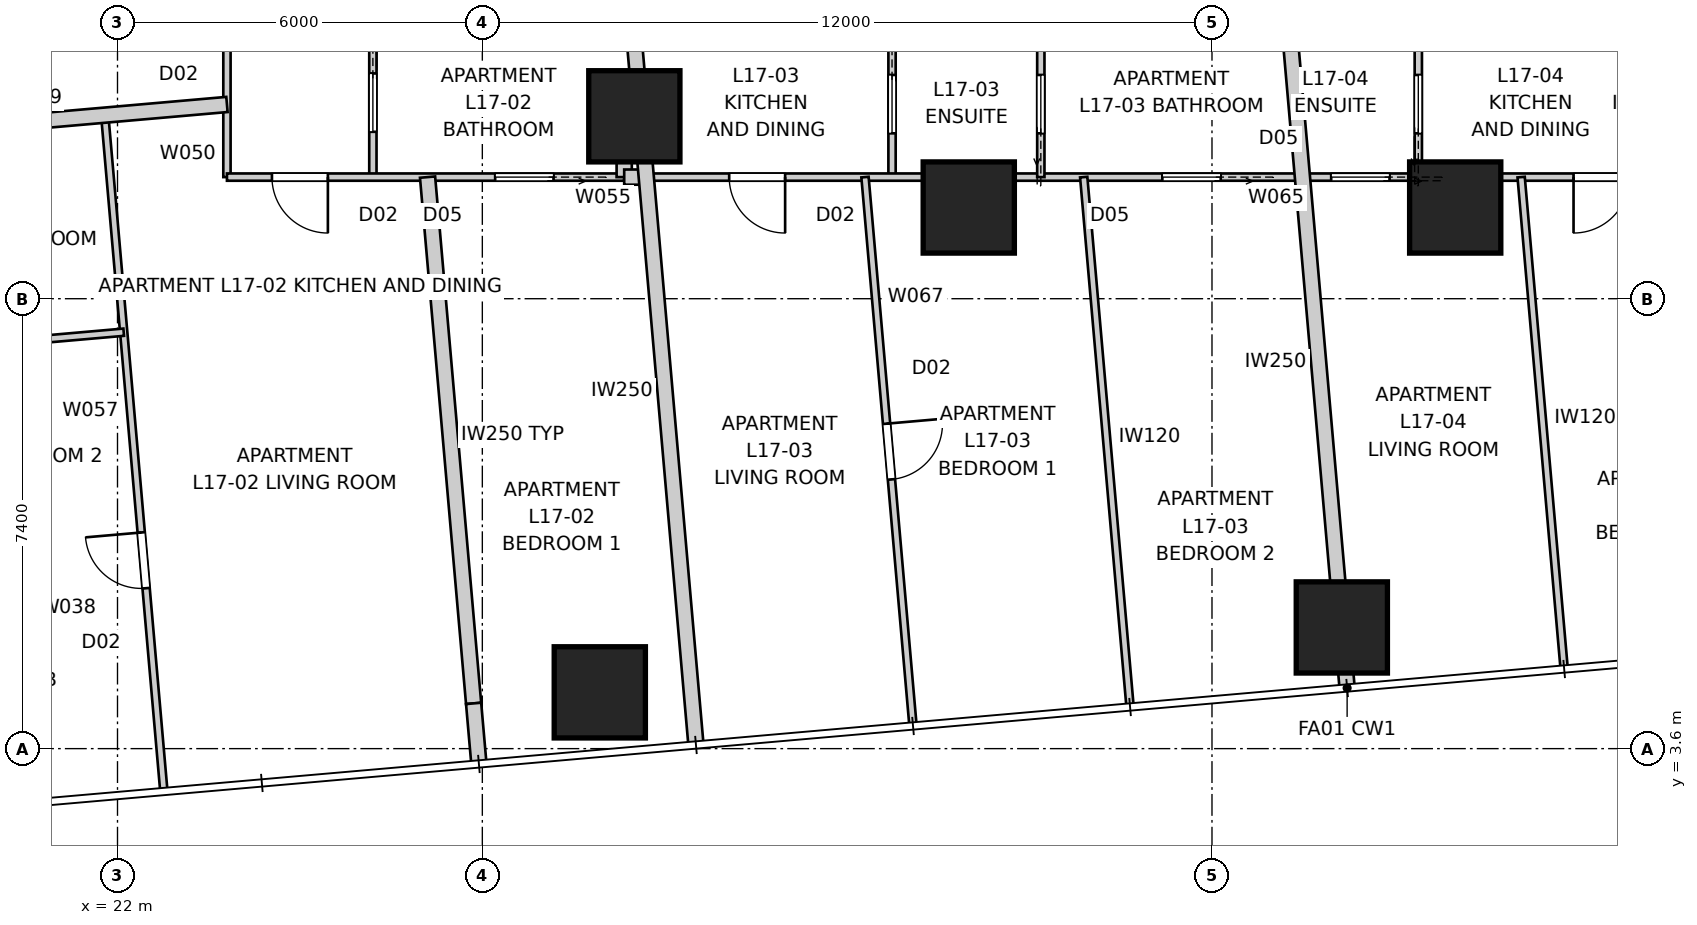
"""IFC4 building model, lengths in metres.
Left out: names, types, materials, properties, quantities, classifications, styles, units other than length and angle.
Written with IfcOpenShell. Run it as: python <this file> out.ifc"""

import sys

from ifc_helpers import new_model, si_unit, direction, frame, frame_2d, origin, origin_2d, place, context, subcontext, project, spatial, rectangle, extrude, element, fill, save


model = new_model("IFC4")
c1 = context("Model", 3, precision=1e-05, world=origin(), true_north=direction((0.0, 1.0)))
c2 = subcontext(c1, "Body", "Model", "MODEL_VIEW")
j1 = project(units=[si_unit("LENGTHUNIT", "METRE"), si_unit("PLANEANGLEUNIT", "RADIAN")], contexts=[c1])
p1 = place(None, origin())
s1 = spatial("IfcSite", under=j1, at=p1, CompositionType="ELEMENT")
p2 = place(p1, origin())
s2 = spatial("IfcBuilding", under=s1, at=p2, CompositionType="ELEMENT")
p3 = place(p2, frame((0.0, 0.0, 64.2)))
s3 = spatial("IfcBuildingStorey", under=s2, at=p3, CompositionType="ELEMENT", Elevation=64.2)
for number, where, z_axis, x_axis in (
    (1, (29.932, 4.526, 0.0), (0.0, 0.0, 1.0), (1.0, 0.0, 0.0)),
    (2, (42.135, 5.593, 0.0), (0.0, 0.0, 1.0), (1.0, 0.0, 0.0)),
    (3, (30.5, 14.0, 0.0), (0.0, 0.0, 1.0), (1.0, 0.0, 0.0)),
    (4, (36.0, 12.5, 0.0), (0.0, 0.0, 1.0), (1.0, 0.0, 0.0)),
    (5, (44.0, 12.5, 0.0), (0.0, 0.0, 1.0), (1.0, 0.0, 0.0)),
):
    element("IfcColumn", number, at=place(p3, frame(where, z_axis=z_axis, x_axis=x_axis)), inside=s3, PredefinedType="COLUMN", context=c2, shape_type="SweptSolid", body=[
        extrude(rectangle(XDim=1.5, YDim=1.5, at=origin_2d()), origin(), (0.0, 0.0, 1.0), 3.4),
    ])
p4 = place(p3, frame((42.222, 4.597, 0.0), z_axis=(0.0, 0.0, 1.0), x_axis=(-0.087140211333, 0.996196056792, 0.0)))
e6 = element("IfcWall", 6, at=p4, inside=s3, PredefinedType="PARTITIONING", context=c2, shape_type="SweptSolid", body=[
    extrude(rectangle(XDim=10.873, YDim=0.25, at=frame_2d((5.437, 0.0))), origin(), (0.0, 0.0, 1.0), 3.25),
])
p5 = place(p3, frame((31.513, 3.66, 0.0), z_axis=(0.0, 0.0, 1.0), x_axis=(-0.087168232078, 0.996193605338, 0.0)))
e7 = element("IfcWall", 7, at=p5, inside=s3, PredefinedType="PARTITIONING", context=c2, shape_type="SweptSolid", body=[
    extrude(rectangle(XDim=11.814, YDim=0.25, at=frame_2d((5.907, 0.0))), origin(), (0.0, 0.0, 1.0), 3.25),
])
p6 = place(p3, frame((23.8, 13.0, 0.0), z_axis=(0.0, 0.0, 1.0), x_axis=(0.0, 1.0, 0.0)))
e8 = element("IfcWall", 8, at=p6, inside=s3, PredefinedType="PARTITIONING", context=c2, shape_type="SweptSolid", body=[
    extrude(rectangle(XDim=8.439, YDim=0.12, at=frame_2d((4.219, 0.0))), origin(), (0.0, 0.0, 1.0), 2.55),
])
p7 = place(p6, frame((2.508, 0.0, 0.0)))
e9 = element("IfcOpeningElement", 9, at=p7, cuts=e8, PredefinedType="OPENING", context=c2, shape_type="SweptSolid", body=[
    extrude(rectangle(XDim=0.92, YDim=2.34, at=frame_2d((0.46, 1.17))), frame((0.0, 0.07, 0.0), z_axis=(0.0, -1.0, 0.0), x_axis=(1.0, 0.0, 0.0)), (0.0, 0.0, 1.0), 0.14),
])
p8 = place(p6, frame((5.685, 0.0, 0.0)))
e10 = element("IfcOpeningElement", 10, at=p8, cuts=e8, PredefinedType="OPENING", context=c2, shape_type="SweptSolid", body=[
    extrude(rectangle(XDim=0.96, YDim=2.1, at=frame_2d((0.48, 1.05))), frame((0.0, 0.07, 0.0), z_axis=(0.0, -1.0, 0.0), x_axis=(1.0, 0.0, 0.0)), (0.0, 0.0, 1.0), 0.14),
])
p9 = place(p3, frame((26.2, 15.45, 0.0), z_axis=(0.0, 0.0, 1.0), x_axis=(0.0, -1.0, 0.0)))
e11 = element("IfcWall", 11, at=p9, inside=s3, PredefinedType="PARTITIONING", context=c2, shape_type="SweptSolid", body=[
    extrude(rectangle(XDim=2.45, YDim=0.12, at=frame_2d((1.225, 0.0))), origin(), (0.0, 0.0, 1.0), 3.25),
])
p10 = place(p9, frame((0.745, 0.0, 0.0)))
e12 = element("IfcOpeningElement", 12, at=p10, cuts=e11, PredefinedType="OPENING", context=c2, shape_type="SweptSolid", body=[
    extrude(rectangle(XDim=0.96, YDim=2.1, at=frame_2d((0.48, 1.05))), frame((0.0, 0.07, 0.0), z_axis=(0.0, -1.0, 0.0), x_axis=(1.0, 0.0, 0.0)), (0.0, 0.0, 1.0), 0.14),
])
p11 = place(p3, frame((30.333, 13.0, 0.0), z_axis=(0.0, 0.0, 1.0), x_axis=(-1.0, 0.0, 0.0)))
e13 = element("IfcWall", 13, at=p11, inside=s3, PredefinedType="PARTITIONING", context=c2, shape_type="SweptSolid", body=[
    extrude(rectangle(XDim=6.533, YDim=0.12, at=frame_2d((3.267, 0.0))), origin(), (0.0, 0.0, 1.0), 3.25),
])
p12 = place(p11, frame((4.873, 0.0, 0.0)))
e14 = element("IfcOpeningElement", 14, at=p12, cuts=e13, PredefinedType="OPENING", context=c2, shape_type="SweptSolid", body=[
    extrude(rectangle(XDim=0.92, YDim=2.34, at=frame_2d((0.46, 1.17))), frame((0.0, 0.07, 0.0), z_axis=(0.0, -1.0, 0.0), x_axis=(1.0, 0.0, 0.0)), (0.0, 0.0, 1.0), 0.14),
])
p13 = place(p11, frame((1.162, 0.0, 0.0)))
e15 = element("IfcOpeningElement", 15, at=p13, cuts=e13, PredefinedType="OPENING", context=c2, shape_type="SweptSolid", body=[
    extrude(rectangle(XDim=0.96, YDim=2.1, at=frame_2d((0.48, 1.05))), frame((0.0, 0.07, 0.0), z_axis=(0.0, -1.0, 0.0), x_axis=(1.0, 0.0, 0.0)), (0.0, 0.0, 1.0), 0.14),
])
p14 = place(p3, frame((30.333, 14.396, 0.0), z_axis=(0.0, 0.0, 1.0), x_axis=(0.0, -1.0, 0.0)))
e16 = element("IfcWall", 16, at=p14, inside=s3, PredefinedType="PARTITIONING", context=c2, shape_type="SweptSolid", body=[
    extrude(rectangle(XDim=1.396, YDim=0.25, at=frame_2d((0.698, 0.0))), origin(), (0.0, 0.0, 1.0), 3.25),
])
p15 = place(p3, frame((22.759, 2.934, 0.0), z_axis=(0.0, 0.0, 1.0), x_axis=(-0.087130477128, 0.996196908224, 0.0)))
e17 = element("IfcWall", 17, at=p15, inside=s3, PredefinedType="PARTITIONING", context=c2, shape_type="SweptSolid", body=[
    extrude(rectangle(XDim=11.127, YDim=0.12, at=frame_2d((5.563, 0.0))), origin(), (0.0, 0.0, 1.0), 3.25),
])
p16 = place(p15, frame((3.317, 0.0, 0.0)))
e18 = element("IfcOpeningElement", 18, at=p16, cuts=e17, PredefinedType="OPENING", context=c2, shape_type="SweptSolid", body=[
    extrude(rectangle(XDim=0.92, YDim=2.34, at=frame_2d((0.46, 1.17))), frame((0.0, 0.07, 0.0), z_axis=(0.0, -1.0, 0.0), x_axis=(1.0, 0.0, 0.0)), (0.0, 0.0, 1.0), 0.14),
])
p17 = place(p3, frame((16.843, 13.586, 0.0), z_axis=(0.0, 0.0, 1.0), x_axis=(0.996195462691, 0.087147002895, 0.0)))
e19 = element("IfcWall", 19, at=p17, inside=s3, PredefinedType="PARTITIONING", context=c2, shape_type="SweptSolid", body=[
    extrude(rectangle(XDim=6.984, YDim=0.25, at=frame_2d((3.492, 0.0))), origin(), (0.0, 0.0, 1.0), 2.638),
])
p18 = place(p17, frame((1.548, 0.0, 0.0)))
e20 = element("IfcOpeningElement", 20, at=p18, cuts=e19, PredefinedType="OPENING", context=c2, shape_type="SweptSolid", body=[
    extrude(rectangle(XDim=0.92, YDim=2.34, at=frame_2d((0.46, 1.17))), frame((0.0, 0.135, 0.0), z_axis=(0.0, -1.0, 0.0), x_axis=(1.0, 0.0, 0.0)), (0.0, 0.0, 1.0), 0.27),
])
p19 = place(p3, frame((27.099, 13.0, 0.0), z_axis=(0.0, 0.0, 1.0), x_axis=(0.087158236544, -0.99619447991, 0.0)))
e21 = element("IfcWall", 21, at=p19, inside=s3, PredefinedType="PARTITIONING", context=c2, shape_type="SweptSolid", body=[
    extrude(rectangle(XDim=8.689, YDim=0.25, at=frame_2d((4.344, 0.0))), origin(), (0.0, 0.0, 1.0), 2.638),
])
p20 = place(p3, frame((27.856, 4.344, 0.0), z_axis=(0.0, 0.0, 1.0), x_axis=(0.087233202944, -0.996187918168, 0.0)))
e22 = element("IfcWall", 22, at=p20, inside=s3, PredefinedType="PARTITIONING", context=c2, shape_type="SweptSolid", body=[
    extrude(rectangle(XDim=0.96, YDim=0.25, at=frame_2d((0.48, 0.0))), origin(), (0.0, 0.0, 1.0), 3.25),
])
p21 = place(p3, frame((30.333, 13.0, 0.0), z_axis=(0.0, 0.0, 1.0), x_axis=(1.0, 0.0, 0.0)))
e23 = element("IfcWall", 23, at=p21, inside=s3, PredefinedType="PARTITIONING", context=c2, shape_type="SweptSolid", body=[
    extrude(rectangle(XDim=0.363, YDim=0.25, at=frame_2d((0.182, 0.0))), origin(), (0.0, 0.0, 1.0), 3.25),
])
p22 = place(p3, frame((16.198, 9.933, 0.0), z_axis=(0.0, 0.0, 1.0), x_axis=(0.996196712973, 0.08713270948, 0.0)))
e24 = element("IfcWall", 24, at=p22, inside=s3, PredefinedType="PARTITIONING", context=c2, shape_type="SweptSolid", body=[
    extrude(rectangle(XDim=5.926, YDim=0.12, at=frame_2d((2.963, 0.0))), origin(), (0.0, 0.0, 1.0), 3.25),
])
p23 = place(p3, frame((34.738, 15.4, 0.0), z_axis=(0.0, 0.0, 1.0), x_axis=(0.0, -1.0, 0.0)))
e25 = element("IfcWall", 25, at=p23, inside=s3, PredefinedType="PARTITIONING", context=c2, shape_type="SweptSolid", body=[
    extrude(rectangle(XDim=2.4, YDim=0.12, at=frame_2d((1.2, 0.0))), origin(), (0.0, 0.0, 1.0), 3.25),
])
p24 = place(p23, frame((0.72, 0.0, 0.0)))
e26 = element("IfcOpeningElement", 26, at=p24, cuts=e25, PredefinedType="OPENING", context=c2, shape_type="SweptSolid", body=[
    extrude(rectangle(XDim=0.96, YDim=2.1, at=frame_2d((0.48, 1.05))), frame((0.0, 0.07, 0.0), z_axis=(0.0, -1.0, 0.0), x_axis=(1.0, 0.0, 0.0)), (0.0, 0.0, 1.0), 0.14),
])
p25 = place(p3, frame((47.778, 13.0, 0.0), z_axis=(0.0, 0.0, 1.0), x_axis=(-1.0, 0.0, 0.0)))
e27 = element("IfcWall", 27, at=p25, inside=s3, PredefinedType="PARTITIONING", context=c2, shape_type="SweptSolid", body=[
    extrude(rectangle(XDim=17.082, YDim=0.12, at=frame_2d((8.541, 0.0))), origin(), (0.0, 0.0, 1.0), 2.55),
])
p26 = place(p25, frame((0.912, 0.0, 0.0)))
e28 = element("IfcOpeningElement", 28, at=p26, cuts=e27, PredefinedType="OPENING", context=c2, shape_type="SweptSolid", body=[
    extrude(rectangle(XDim=0.92, YDim=2.34, at=frame_2d((0.46, 1.17))), frame((0.0, 0.07, 0.0), z_axis=(0.0, -1.0, 0.0), x_axis=(1.0, 0.0, 0.0)), (0.0, 0.0, 1.0), 0.14),
])
p27 = place(p25, frame((14.798, 0.0, 0.0)))
e29 = element("IfcOpeningElement", 29, at=p27, cuts=e27, PredefinedType="OPENING", context=c2, shape_type="SweptSolid", body=[
    extrude(rectangle(XDim=0.92, YDim=2.34, at=frame_2d((0.46, 1.17))), frame((0.0, 0.07, 0.0), z_axis=(0.0, -1.0, 0.0), x_axis=(1.0, 0.0, 0.0)), (0.0, 0.0, 1.0), 0.14),
])
p28 = place(p25, frame((4.858, 0.0, 0.0)))
e30 = element("IfcOpeningElement", 30, at=p28, cuts=e27, PredefinedType="OPENING", context=c2, shape_type="SweptSolid", body=[
    extrude(rectangle(XDim=0.96, YDim=2.1, at=frame_2d((0.48, 1.05))), frame((0.0, 0.07, 0.0), z_axis=(0.0, -1.0, 0.0), x_axis=(1.0, 0.0, 0.0)), (0.0, 0.0, 1.0), 0.14),
])
p29 = place(p25, frame((7.635, 0.0, 0.0)))
e31 = element("IfcOpeningElement", 31, at=p29, cuts=e27, PredefinedType="OPENING", context=c2, shape_type="SweptSolid", body=[
    extrude(rectangle(XDim=0.96, YDim=2.1, at=frame_2d((0.48, 1.05))), frame((0.0, 0.07, 0.0), z_axis=(0.0, -1.0, 0.0), x_axis=(1.0, 0.0, 0.0)), (0.0, 0.0, 1.0), 0.14),
])
p30 = place(p3, frame((37.185, 13.0, 0.0), z_axis=(0.0, 0.0, 1.0), x_axis=(0.0, 1.0, 0.0)))
e32 = element("IfcWall", 32, at=p30, inside=s3, PredefinedType="PARTITIONING", context=c2, shape_type="SweptSolid", body=[
    extrude(rectangle(XDim=2.4, YDim=0.12, at=frame_2d((1.2, 0.0))), origin(), (0.0, 0.0, 1.0), 2.796),
])
p31 = place(p30, frame((0.72, 0.0, 0.0)))
e33 = element("IfcOpeningElement", 33, at=p31, cuts=e32, PredefinedType="OPENING", context=c2, shape_type="SweptSolid", body=[
    extrude(rectangle(XDim=0.96, YDim=2.1, at=frame_2d((0.48, 1.05))), frame((0.0, 0.07, 0.0), z_axis=(0.0, -1.0, 0.0), x_axis=(1.0, 0.0, 0.0)), (0.0, 0.0, 1.0), 0.14),
])
p32 = place(p3, frame((34.293, 13.0, 0.0), z_axis=(0.0, 0.0, 1.0), x_axis=(0.087160907995, -0.996194246178, 0.0)))
e34 = element("IfcWall", 34, at=p32, inside=s3, PredefinedType="PARTITIONING", context=c2, shape_type="SweptSolid", body=[
    extrude(rectangle(XDim=9.022, YDim=0.12, at=frame_2d((4.511, 0.0))), origin(), (0.0, 0.0, 1.0), 3.25),
])
p33 = place(p32, frame((4.071, 0.0, 0.0)))
e35 = element("IfcOpeningElement", 35, at=p33, cuts=e34, PredefinedType="OPENING", context=c2, shape_type="SweptSolid", body=[
    extrude(rectangle(XDim=0.92, YDim=2.34, at=frame_2d((0.46, 1.17))), frame((0.0, 0.07, 0.0), z_axis=(0.0, -1.0, 0.0), x_axis=(1.0, 0.0, 0.0)), (0.0, 0.0, 1.0), 0.14),
])
p34 = place(p3, frame((37.89, 13.0, 0.0), z_axis=(0.0, 0.0, 1.0), x_axis=(0.087158256162, -0.996194478193, 0.0)))
e36 = element("IfcWall", 36, at=p34, inside=s3, PredefinedType="PARTITIONING", context=c2, shape_type="SweptSolid", body=[
    extrude(rectangle(XDim=8.709, YDim=0.12, at=frame_2d((4.354, 0.0))), origin(), (0.0, 0.0, 1.0), 3.25),
])
p35 = place(p3, frame((43.393, 13.0, 0.0), z_axis=(0.0, 0.0, 1.0), x_axis=(0.0, 1.0, 0.0)))
e37 = element("IfcWall", 37, at=p35, inside=s3, PredefinedType="PARTITIONING", context=c2, shape_type="SweptSolid", body=[
    extrude(rectangle(XDim=2.4, YDim=0.12, at=frame_2d((1.2, 0.0))), origin(), (0.0, 0.0, 1.0), 3.25),
])
p36 = place(p35, frame((0.72, 0.0, 0.0)))
e38 = element("IfcOpeningElement", 38, at=p36, cuts=e37, PredefinedType="OPENING", context=c2, shape_type="SweptSolid", body=[
    extrude(rectangle(XDim=0.96, YDim=2.1, at=frame_2d((0.48, 1.05))), frame((0.0, 0.07, 0.0), z_axis=(0.0, -1.0, 0.0), x_axis=(1.0, 0.0, 0.0)), (0.0, 0.0, 1.0), 0.14),
])
p37 = place(p3, frame((45.084, 13.0, 0.0), z_axis=(0.0, 0.0, 1.0), x_axis=(0.087184938313, -0.99619214338, 0.0)))
e39 = element("IfcWall", 39, at=p37, inside=s3, PredefinedType="PARTITIONING", context=c2, shape_type="SweptSolid", body=[
    extrude(rectangle(XDim=8.082, YDim=0.12, at=frame_2d((4.041, 0.0))), origin(), (0.0, 0.0, 1.0), 3.25),
])
p38 = place(p26, origin())
e40 = element("IfcDoor", 40, at=p38, inside=s3, OperationType="SINGLE_SWING_RIGHT", PredefinedType="DOOR", context=c2, shape_type="SweptSolid", body=[
    extrude(rectangle(XDim=0.92, YDim=2.34, at=frame_2d((0.46, 1.17))), frame((0.0, 0.025, 0.0), z_axis=(0.0, -1.0, 0.0), x_axis=(1.0, 0.0, 0.0)), (0.0, 0.0, 1.0), 0.05),
])
fill(e28, e40)
p39 = place(p36, origin())
e41 = element("IfcDoor", 41, at=p39, inside=s3, OperationType="SLIDING_TO_LEFT", PredefinedType="DOOR", context=c2, shape_type="SweptSolid", body=[
    extrude(rectangle(XDim=0.96, YDim=2.1, at=frame_2d((0.48, 1.05))), frame((0.0, 0.025, 0.0), z_axis=(0.0, -1.0, 0.0), x_axis=(1.0, 0.0, 0.0)), (0.0, 0.0, 1.0), 0.05),
])
fill(e38, e41)
p40 = place(p27, origin())
e42 = element("IfcDoor", 42, at=p40, inside=s3, OperationType="SINGLE_SWING_LEFT", PredefinedType="DOOR", context=c2, shape_type="SweptSolid", body=[
    extrude(rectangle(XDim=0.92, YDim=2.34, at=frame_2d((0.46, 1.17))), frame((0.0, 0.025, 0.0), z_axis=(0.0, -1.0, 0.0), x_axis=(1.0, 0.0, 0.0)), (0.0, 0.0, 1.0), 0.05),
])
fill(e29, e42)
p41 = place(p24, origin())
e43 = element("IfcDoor", 43, at=p41, inside=s3, OperationType="SLIDING_TO_LEFT", PredefinedType="DOOR", context=c2, shape_type="SweptSolid", body=[
    extrude(rectangle(XDim=0.96, YDim=2.1, at=frame_2d((0.48, 1.05))), frame((0.0, 0.025, 0.0), z_axis=(0.0, -1.0, 0.0), x_axis=(1.0, 0.0, 0.0)), (0.0, 0.0, 1.0), 0.05),
])
fill(e26, e43)
p42 = place(p10, origin())
e44 = element("IfcDoor", 44, at=p42, inside=s3, OperationType="SLIDING_TO_LEFT", PredefinedType="DOOR", context=c2, shape_type="SweptSolid", body=[
    extrude(rectangle(XDim=0.96, YDim=2.1, at=frame_2d((0.48, 1.05))), frame((0.0, 0.025, 0.0), z_axis=(0.0, -1.0, 0.0), x_axis=(1.0, 0.0, 0.0)), (0.0, 0.0, 1.0), 0.05),
])
fill(e12, e44)
p43 = place(p12, origin())
e45 = element("IfcDoor", 45, at=p43, inside=s3, OperationType="SINGLE_SWING_LEFT", PredefinedType="DOOR", context=c2, shape_type="SweptSolid", body=[
    extrude(rectangle(XDim=0.92, YDim=2.34, at=frame_2d((0.46, 1.17))), frame((0.0, 0.025, 0.0), z_axis=(0.0, -1.0, 0.0), x_axis=(1.0, 0.0, 0.0)), (0.0, 0.0, 1.0), 0.05),
])
fill(e14, e45)
p44 = place(p28, origin())
e46 = element("IfcDoor", 46, at=p44, inside=s3, OperationType="SLIDING_TO_LEFT", PredefinedType="DOOR", context=c2, shape_type="SweptSolid", body=[
    extrude(rectangle(XDim=0.96, YDim=2.1, at=frame_2d((0.48, 1.05))), frame((0.0, 0.025, 0.0), z_axis=(0.0, -1.0, 0.0), x_axis=(1.0, 0.0, 0.0)), (0.0, 0.0, 1.0), 0.05),
])
fill(e30, e46)
p45 = place(p33, origin())
e47 = element("IfcDoor", 47, at=p45, inside=s3, OperationType="SINGLE_SWING_LEFT", PredefinedType="DOOR", context=c2, shape_type="SweptSolid", body=[
    extrude(rectangle(XDim=0.92, YDim=2.34, at=frame_2d((0.46, 1.17))), frame((0.0, 0.025, 0.0), z_axis=(0.0, -1.0, 0.0), x_axis=(1.0, 0.0, 0.0)), (0.0, 0.0, 1.0), 0.05),
])
fill(e35, e47)
p46 = place(p31, origin())
e48 = element("IfcDoor", 48, at=p46, inside=s3, OperationType="SLIDING_TO_LEFT", PredefinedType="DOOR", context=c2, shape_type="SweptSolid", body=[
    extrude(rectangle(XDim=0.96, YDim=2.1, at=frame_2d((0.48, 1.05))), frame((0.0, 0.025, 0.0), z_axis=(0.0, -1.0, 0.0), x_axis=(1.0, 0.0, 0.0)), (0.0, 0.0, 1.0), 0.05),
])
fill(e33, e48)
p47 = place(p13, origin())
e49 = element("IfcDoor", 49, at=p47, inside=s3, OperationType="SLIDING_TO_LEFT", PredefinedType="DOOR", context=c2, shape_type="SweptSolid", body=[
    extrude(rectangle(XDim=0.96, YDim=2.1, at=frame_2d((0.48, 1.05))), frame((0.0, 0.025, 0.0), z_axis=(0.0, -1.0, 0.0), x_axis=(1.0, 0.0, 0.0)), (0.0, 0.0, 1.0), 0.05),
])
fill(e15, e49)
p48 = place(p16, origin())
e50 = element("IfcDoor", 50, at=p48, inside=s3, OperationType="SINGLE_SWING_RIGHT", PredefinedType="DOOR", context=c2, shape_type="SweptSolid", body=[
    extrude(rectangle(XDim=0.92, YDim=2.34, at=frame_2d((0.46, 1.17))), frame((0.0, 0.025, 0.0), z_axis=(0.0, -1.0, 0.0), x_axis=(1.0, 0.0, 0.0)), (0.0, 0.0, 1.0), 0.05),
])
fill(e18, e50)
p49 = place(p29, origin())
e51 = element("IfcDoor", 51, at=p49, inside=s3, OperationType="SLIDING_TO_LEFT", PredefinedType="DOOR", context=c2, shape_type="SweptSolid", body=[
    extrude(rectangle(XDim=0.96, YDim=2.1, at=frame_2d((0.48, 1.05))), frame((0.0, 0.025, 0.0), z_axis=(0.0, -1.0, 0.0), x_axis=(1.0, 0.0, 0.0)), (0.0, 0.0, 1.0), 0.05),
])
fill(e31, e51)
save(model, sys.argv[1])
